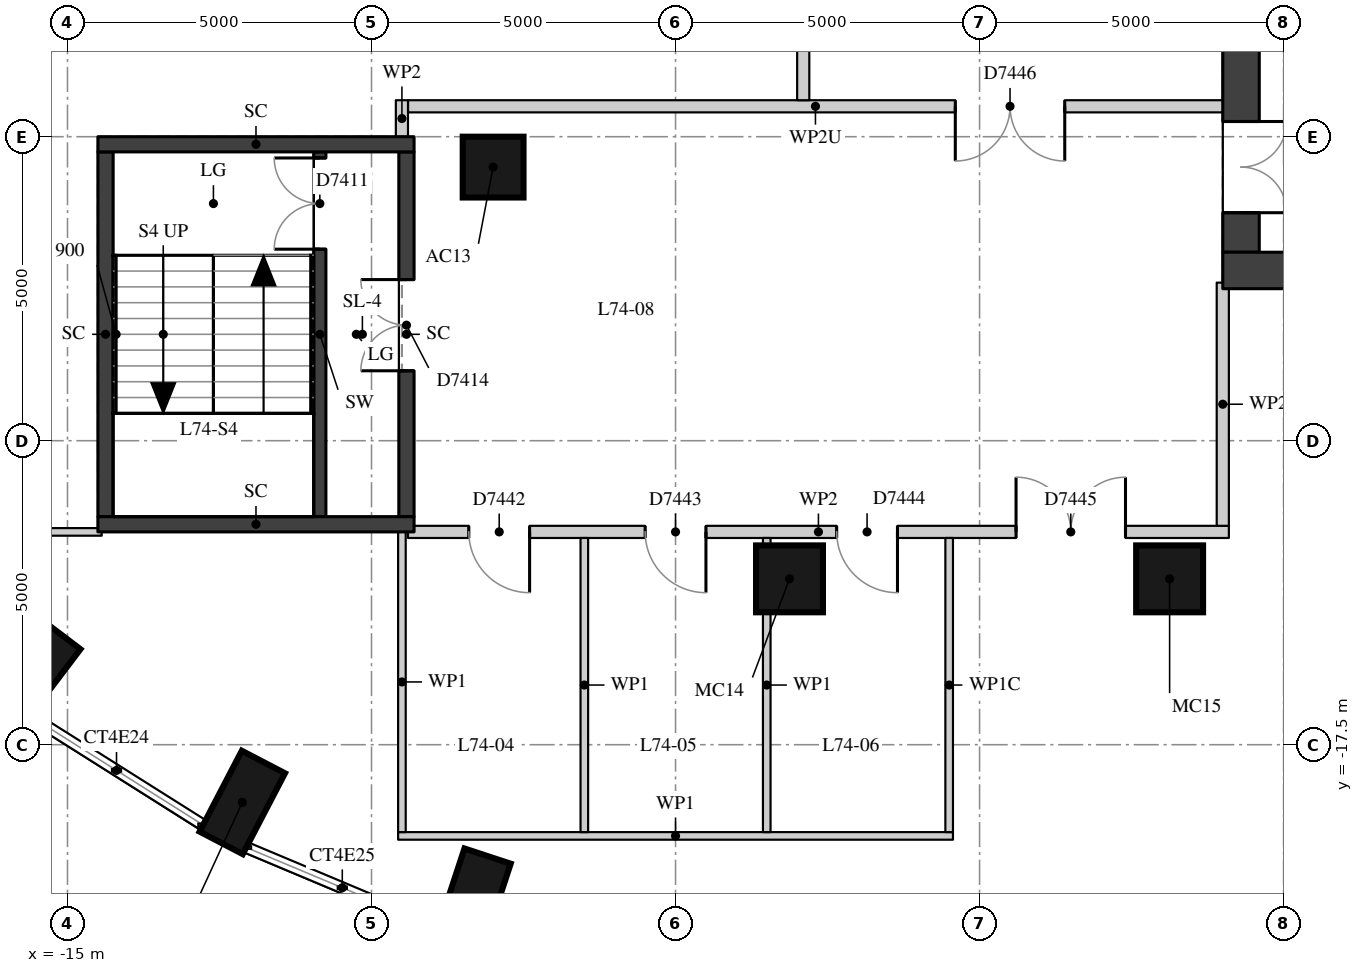
"""IFC4 building model, lengths in metres.
Left out: names, types, materials, properties, quantities, classifications, styles, units other than length and angle.
Written with IfcOpenShell. Run it as: python <this file> out.ifc"""

import sys

from ifc_helpers import new_model, si_unit, direction, frame, frame_2d, origin, origin_2d, place, context, subcontext, project, spatial, rectangle, extrude, element, fill, save


model = new_model("IFC4")
c1 = context("Model", 3, precision=1e-05, world=origin(), true_north=direction((0.0, 1.0)))
c2 = subcontext(c1, "Body", "Model", "MODEL_VIEW")
j1 = project(units=[si_unit("LENGTHUNIT", "METRE"), si_unit("PLANEANGLEUNIT", "RADIAN")], contexts=[c1])
p1 = place(None, origin())
s1 = spatial("IfcSite", under=j1, at=p1, CompositionType="ELEMENT")
p2 = place(p1, origin())
s2 = spatial("IfcBuilding", under=s1, at=p2, CompositionType="ELEMENT")
p3 = place(p2, frame((0.0, 0.0, 259.7)))
s3 = spatial("IfcBuildingStorey", under=s2, at=p3, CompositionType="ELEMENT", Elevation=259.7)
for number, where, z_axis, x_axis in (
    (1, (-15.559, -16.285, 0.0), (0.0, 0.0, 1.0), (-0.604, -0.797, 0.0)),
    (2, (-12.125, -18.449, 0.0), (0.0, 0.0, 1.0), (-0.462, -0.887, 0.0)),
    (3, (-8.326, -20.044, 0.0), (0.0, 0.0, 1.0), (-0.312, -0.95, 0.0)),
):
    element("IfcColumn", number, at=place(p3, frame(where, z_axis=z_axis, x_axis=x_axis)), inside=s3, PredefinedType="COLUMN", context=c2, shape_type="SweptSolid", body=[
        extrude(rectangle(XDim=1.5, YDim=0.8, at=origin_2d()), origin(), (0.0, 0.0, 1.0), 4.5),
    ])
p4 = place(p3, frame((-8.0, -8.0, 0.0), z_axis=(0.0, 0.0, 1.0), x_axis=(1.0, 0.0, 0.0)))
e4 = element("IfcColumn", 4, at=p4, inside=s3, PredefinedType="COLUMN", context=c2, shape_type="SweptSolid", body=[
    extrude(rectangle(XDim=1.0, YDim=1.0, at=origin_2d()), origin(), (0.0, 0.0, 1.0), 4.5),
])
for number, where, z_axis, x_axis in (
    (5, (-3.126, -14.772, 0.0), (0.0, 0.0, 1.0), (1.0, 0.0, 0.0)),
    (6, (3.126, -14.772, 0.0), (0.0, 0.0, 1.0), (1.0, 0.0, 0.0)),
):
    element("IfcColumn", number, at=place(p3, frame(where, z_axis=z_axis, x_axis=x_axis)), inside=s3, PredefinedType="COLUMN", context=c2, shape_type="SweptSolid", body=[
        extrude(rectangle(XDim=1.1, YDim=1.1, at=origin_2d()), origin(), (0.0, 0.0, 1.0), 4.5),
    ])
p5 = place(p3, frame((4.3, -9.4, 0.0), z_axis=(0.0, 0.0, 1.0), x_axis=(0.0, 1.0, 0.0)))
e7 = element("IfcWall", 7, at=p5, inside=s3, PredefinedType="SHEAR", context=c2, shape_type="SweptSolid", body=[
    extrude(rectangle(XDim=18.8, YDim=0.6, at=frame_2d((9.4, 0.0))), origin(), (0.0, 0.0, 1.0), 4.15),
])
p6 = place(p5, frame((0.65, 0.0, 0.0)))
e8 = element("IfcOpeningElement", 8, at=p6, cuts=e7, PredefinedType="OPENING", context=c2, shape_type="SweptSolid", body=[
    extrude(rectangle(XDim=1.5, YDim=2.1, at=frame_2d((0.75, 1.05))), frame((0.0, 0.31, 0.0), z_axis=(0.0, -1.0, 0.0), x_axis=(1.0, 0.0, 0.0)), (0.0, 0.0, 1.0), 0.62),
])
p7 = place(p5, frame((3.75, 0.0, 0.0)))
e9 = element("IfcOpeningElement", 9, at=p7, cuts=e7, PredefinedType="OPENING", context=c2, shape_type="SweptSolid", body=[
    extrude(rectangle(XDim=1.8, YDim=2.1, at=frame_2d((0.9, 1.05))), frame((0.0, 0.31, 0.0), z_axis=(0.0, -1.0, 0.0), x_axis=(1.0, 0.0, 0.0)), (0.0, 0.0, 1.0), 0.62),
])
p8 = place(p5, frame((6.25, 0.0, 0.0)))
e10 = element("IfcOpeningElement", 10, at=p8, cuts=e7, PredefinedType="OPENING", context=c2, shape_type="SweptSolid", body=[
    extrude(rectangle(XDim=1.1, YDim=2.1, at=frame_2d((0.55, 1.05))), frame((0.0, 0.31, 0.0), z_axis=(0.0, -1.0, 0.0), x_axis=(1.0, 0.0, 0.0)), (0.0, 0.0, 1.0), 0.62),
])
p9 = place(p5, frame((8.9, 0.0, 0.0)))
e11 = element("IfcOpeningElement", 11, at=p9, cuts=e7, PredefinedType="OPENING", context=c2, shape_type="SweptSolid", body=[
    extrude(rectangle(XDim=1.0, YDim=2.1, at=frame_2d((0.5, 1.05))), frame((0.0, 0.31, 0.0), z_axis=(0.0, -1.0, 0.0), x_axis=(1.0, 0.0, 0.0)), (0.0, 0.0, 1.0), 0.62),
])
p10 = place(p5, frame((11.45, 0.0, 0.0)))
e12 = element("IfcOpeningElement", 12, at=p10, cuts=e7, PredefinedType="OPENING", context=c2, shape_type="SweptSolid", body=[
    extrude(rectangle(XDim=1.1, YDim=2.1, at=frame_2d((0.55, 1.05))), frame((0.0, 0.31, 0.0), z_axis=(0.0, -1.0, 0.0), x_axis=(1.0, 0.0, 0.0)), (0.0, 0.0, 1.0), 0.62),
])
p11 = place(p5, frame((13.25, 0.0, 0.0)))
e13 = element("IfcOpeningElement", 13, at=p11, cuts=e7, PredefinedType="OPENING", context=c2, shape_type="SweptSolid", body=[
    extrude(rectangle(XDim=1.8, YDim=2.1, at=frame_2d((0.9, 1.05))), frame((0.0, 0.31, 0.0), z_axis=(0.0, -1.0, 0.0), x_axis=(1.0, 0.0, 0.0)), (0.0, 0.0, 1.0), 0.62),
])
p12 = place(p5, frame((16.65, 0.0, 0.0)))
e14 = element("IfcOpeningElement", 14, at=p12, cuts=e7, PredefinedType="OPENING", context=c2, shape_type="SweptSolid", body=[
    extrude(rectangle(XDim=1.5, YDim=2.1, at=frame_2d((0.75, 1.05))), frame((0.0, 0.31, 0.0), z_axis=(0.0, -1.0, 0.0), x_axis=(1.0, 0.0, 0.0)), (0.0, 0.0, 1.0), 0.62),
])
p13 = place(p3, frame((4.0, -9.7, 0.0), z_axis=(0.0, 0.0, 1.0), x_axis=(1.0, 0.0, 0.0)))
e15 = element("IfcWall", 15, at=p13, inside=s3, PredefinedType="SHEAR", context=c2, shape_type="SweptSolid", body=[
    extrude(rectangle(XDim=12.0, YDim=0.6, at=frame_2d((6.0, 0.0))), origin(), (0.0, 0.0, 1.0), 4.15),
])
p14 = place(p3, frame((-10.85, -13.75, 0.0), z_axis=(0.0, 0.0, 1.0), x_axis=(0.0, 1.0, 0.0)))
e16 = element("IfcWall", 16, at=p14, inside=s3, PredefinedType="SHEAR", context=c2, shape_type="SweptSolid", body=[
    extrude(rectangle(XDim=6.0, YDim=0.2, at=frame_2d((3.0, 0.0))), origin(), (0.0, 0.0, 1.0), 4.15),
])
p15 = place(p14, frame((4.4, 0.0, 0.0)))
e17 = element("IfcOpeningElement", 17, at=p15, cuts=e16, PredefinedType="OPENING", context=c2, shape_type="SweptSolid", body=[
    extrude(rectangle(XDim=1.5, YDim=2.1, at=frame_2d((0.75, 1.05))), frame((0.0, 0.11, 0.0), z_axis=(0.0, -1.0, 0.0), x_axis=(1.0, 0.0, 0.0)), (0.0, 0.0, 1.0), 0.22),
])
p16 = place(p3, frame((-14.375, -13.75, -0.35), z_axis=(0.0, 0.0, 1.0), x_axis=(0.0, 1.0, 0.0)))
e18 = element("IfcWall", 18, at=p16, inside=s3, PredefinedType="SHEAR", context=c2, shape_type="SweptSolid", body=[
    extrude(rectangle(XDim=6.0, YDim=0.25, at=frame_2d((3.0, 0.0))), origin(), (0.0, 0.0, 1.0), 4.5),
])
p17 = place(p3, frame((-9.425, -13.75, -0.35), z_axis=(0.0, 0.0, 1.0), x_axis=(0.0, 1.0, 0.0)))
e19 = element("IfcWall", 19, at=p17, inside=s3, PredefinedType="SHEAR", context=c2, shape_type="SweptSolid", body=[
    extrude(rectangle(XDim=6.0, YDim=0.25, at=frame_2d((3.0, 0.0))), origin(), (0.0, 0.0, 1.0), 4.5),
])
p18 = place(p17, frame((2.4, 0.0, 0.35)))
e20 = element("IfcOpeningElement", 20, at=p18, cuts=e19, PredefinedType="OPENING", context=c2, shape_type="SweptSolid", body=[
    extrude(rectangle(XDim=1.5, YDim=2.1, at=frame_2d((0.75, 1.05))), frame((0.0, 0.135, 0.0), z_axis=(0.0, -1.0, 0.0), x_axis=(1.0, 0.0, 0.0)), (0.0, 0.0, 1.0), 0.27),
])
for number, where, z_axis, x_axis in (
    (21, (-14.5, -7.625, -0.35), (0.0, 0.0, 1.0), (1.0, 0.0, 0.0)),
    (22, (-14.5, -13.875, -0.35), (0.0, 0.0, 1.0), (1.0, 0.0, 0.0)),
):
    element("IfcWall", number, at=place(p3, frame(where, z_axis=z_axis, x_axis=x_axis)), inside=s3, PredefinedType="SHEAR", context=c2, shape_type="SweptSolid", body=[
        extrude(rectangle(XDim=5.2, YDim=0.25, at=frame_2d((2.6, 0.0))), origin(), (0.0, 0.0, 1.0), 4.5),
    ])
p19 = place(p3, frame((-9.562, -19.0, 0.0), z_axis=(0.0, 0.0, 1.0), x_axis=(1.0, 0.0, 0.0)))
e23 = element("IfcWall", 23, at=p19, inside=s3, PredefinedType="PARTITIONING", context=c2, shape_type="SweptSolid", body=[
    extrude(rectangle(XDim=9.125, YDim=0.125, at=frame_2d((4.562, 0.0))), origin(), (0.0, 0.0, 1.0), 4.15),
])
p20 = place(p3, frame((-18.598, -14.0, 0.0), z_axis=(0.0, 0.0, 1.0), x_axis=(1.0, 0.0, 0.0)))
e24 = element("IfcWall", 24, at=p20, inside=s3, PredefinedType="PARTITIONING", context=c2, shape_type="SweptSolid", body=[
    extrude(rectangle(XDim=4.16, YDim=0.125, at=frame_2d((2.08, 0.0))), origin(), (0.0, 0.0, 1.0), 3.7),
])
p21 = place(p20, frame((1.18, 0.0, 0.0)))
e25 = element("IfcOpeningElement", 25, at=p21, cuts=e24, PredefinedType="OPENING", context=c2, shape_type="SweptSolid", body=[
    extrude(rectangle(XDim=1.8, YDim=2.1, at=frame_2d((0.9, 1.05))), frame((0.0, 0.073, 0.0), z_axis=(0.0, -1.0, 0.0), x_axis=(1.0, 0.0, 0.0)), (0.0, 0.0, 1.0), 0.145),
])
p22 = place(p3, frame((-9.4, -14.0, 0.0), z_axis=(0.0, 0.0, 1.0), x_axis=(1.0, 0.0, 0.0)))
e26 = element("IfcWall", 26, at=p22, inside=s3, PredefinedType="PARTITIONING", context=c2, shape_type="SweptSolid", body=[
    extrude(rectangle(XDim=13.5, YDim=0.2, at=frame_2d((6.75, 0.0))), origin(), (0.0, 0.0, 1.0), 4.15),
])
p23 = place(p22, frame((10.0, 0.0, 0.0)))
e27 = element("IfcOpeningElement", 27, at=p23, cuts=e26, PredefinedType="OPENING", context=c2, shape_type="SweptSolid", body=[
    extrude(rectangle(XDim=1.8, YDim=2.1, at=frame_2d((0.9, 1.05))), frame((0.0, 0.11, 0.0), z_axis=(0.0, -1.0, 0.0), x_axis=(1.0, 0.0, 0.0)), (0.0, 0.0, 1.0), 0.22),
])
p24 = place(p22, frame((1.0, 0.0, 0.0)))
e28 = element("IfcOpeningElement", 28, at=p24, cuts=e26, PredefinedType="OPENING", context=c2, shape_type="SweptSolid", body=[
    extrude(rectangle(XDim=1.0, YDim=2.1, at=frame_2d((0.5, 1.05))), frame((0.0, 0.11, 0.0), z_axis=(0.0, -1.0, 0.0), x_axis=(1.0, 0.0, 0.0)), (0.0, 0.0, 1.0), 0.22),
])
p25 = place(p22, frame((3.9, 0.0, 0.0)))
e29 = element("IfcOpeningElement", 29, at=p25, cuts=e26, PredefinedType="OPENING", context=c2, shape_type="SweptSolid", body=[
    extrude(rectangle(XDim=1.0, YDim=2.1, at=frame_2d((0.5, 1.05))), frame((0.0, 0.11, 0.0), z_axis=(0.0, -1.0, 0.0), x_axis=(1.0, 0.0, 0.0)), (0.0, 0.0, 1.0), 0.22),
])
p26 = place(p22, frame((7.05, 0.0, 0.0)))
e30 = element("IfcOpeningElement", 30, at=p26, cuts=e26, PredefinedType="OPENING", context=c2, shape_type="SweptSolid", body=[
    extrude(rectangle(XDim=1.0, YDim=2.1, at=frame_2d((0.5, 1.05))), frame((0.0, 0.11, 0.0), z_axis=(0.0, -1.0, 0.0), x_axis=(1.0, 0.0, 0.0)), (0.0, 0.0, 1.0), 0.22),
])
p27 = place(p3, frame((-9.4, -7.0, 0.0), z_axis=(0.0, 0.0, 1.0), x_axis=(1.0, 0.0, 0.0)))
e31 = element("IfcWall", 31, at=p27, inside=s3, PredefinedType="PARTITIONING", context=c2, shape_type="SweptSolid", body=[
    extrude(rectangle(XDim=13.402, YDim=0.2, at=frame_2d((6.701, 0.0))), origin(), (0.0, 0.0, 1.0), 3.6),
])
p28 = place(p27, frame((9.001, 0.0, 0.0)))
e32 = element("IfcOpeningElement", 32, at=p28, cuts=e31, PredefinedType="OPENING", context=c2, shape_type="SweptSolid", body=[
    extrude(rectangle(XDim=1.8, YDim=2.1, at=frame_2d((0.9, 1.05))), frame((0.0, 0.11, 0.0), z_axis=(0.0, -1.0, 0.0), x_axis=(1.0, 0.0, 0.0)), (0.0, 0.0, 1.0), 0.22),
])
p29 = place(p3, frame((-9.5, -18.938, 0.0), z_axis=(0.0, 0.0, 1.0), x_axis=(0.0, 1.0, 0.0)))
e33 = element("IfcWall", 33, at=p29, inside=s3, PredefinedType="PARTITIONING", context=c2, shape_type="SweptSolid", body=[
    extrude(rectangle(XDim=4.939, YDim=0.125, at=frame_2d((2.47, 0.0))), origin(), (0.0, 0.0, 1.0), 4.15),
])
p30 = place(p3, frame((-9.5, -7.502, 0.0), z_axis=(0.0, 0.0, 1.0), x_axis=(0.0, 1.0, 0.0)))
e34 = element("IfcWall", 34, at=p30, inside=s3, PredefinedType="PARTITIONING", context=c2, shape_type="SweptSolid", body=[
    extrude(rectangle(XDim=0.602, YDim=0.2, at=frame_2d((0.301, 0.0))), origin(), (0.0, 0.0, 1.0), 4.15),
])
for number, where, z_axis, x_axis in (
    (35, (-6.5, -18.938, 0.0), (0.0, 0.0, 1.0), (0.0, 1.0, 0.0)),
    (36, (-3.5, -18.938, 0.0), (0.0, 0.0, 1.0), (0.0, 1.0, 0.0)),
):
    element("IfcWall", number, at=place(p3, frame(where, z_axis=z_axis, x_axis=x_axis)), inside=s3, PredefinedType="PARTITIONING", context=c2, shape_type="SweptSolid", body=[
        extrude(rectangle(XDim=4.837, YDim=0.125, at=frame_2d((2.419, 0.0))), origin(), (0.0, 0.0, 1.0), 4.15),
    ])
p31 = place(p3, frame((-2.9, -6.9, 0.0), z_axis=(0.0, 0.0, 1.0), x_axis=(0.0, 1.0, 0.0)))
e37 = element("IfcWall", 37, at=p31, inside=s3, PredefinedType="PARTITIONING", context=c2, shape_type="SweptSolid", body=[
    extrude(rectangle(XDim=6.034, YDim=0.2, at=frame_2d((3.017, 0.0))), origin(), (0.0, 0.0, 1.0), 4.15),
])
p32 = place(p3, frame((-0.5, -18.938, 0.0), z_axis=(0.0, 0.0, 1.0), x_axis=(0.0, 1.0, 0.0)))
e38 = element("IfcWall", 38, at=p32, inside=s3, PredefinedType="PARTITIONING", context=c2, shape_type="SweptSolid", body=[
    extrude(rectangle(XDim=4.837, YDim=0.125, at=frame_2d((2.419, 0.0))), origin(), (0.0, 0.0, 1.0), 3.7),
])
p33 = place(p3, frame((4.0, -13.9, 0.0), z_axis=(0.0, 0.0, 1.0), x_axis=(0.0, 1.0, 0.0)))
e39 = element("IfcWall", 39, at=p33, inside=s3, PredefinedType="PARTITIONING", context=c2, shape_type="SweptSolid", body=[
    extrude(rectangle(XDim=4.0, YDim=0.2, at=frame_2d((2.0, 0.0))), origin(), (0.0, 0.0, 1.0), 4.15),
])
p34 = place(p6, origin())
e40 = element("IfcDoor", 40, at=p34, inside=s3, OperationType="DOUBLE_DOOR_SINGLE_SWING", PredefinedType="DOOR", context=c2, shape_type="SweptSolid", body=[
    extrude(rectangle(XDim=1.5, YDim=2.1, at=frame_2d((0.75, 1.05))), frame((0.0, 0.025, 0.0), z_axis=(0.0, -1.0, 0.0), x_axis=(1.0, 0.0, 0.0)), (0.0, 0.0, 1.0), 0.05),
])
fill(e8, e40)
p35 = place(p15, origin())
e41 = element("IfcDoor", 41, at=p35, inside=s3, OperationType="DOUBLE_DOOR_SINGLE_SWING", PredefinedType="DOOR", context=c2, shape_type="SweptSolid", body=[
    extrude(rectangle(XDim=1.5, YDim=2.1, at=frame_2d((0.75, 1.05))), frame((0.0, 0.025, 0.0), z_axis=(0.0, -1.0, 0.0), x_axis=(1.0, 0.0, 0.0)), (0.0, 0.0, 1.0), 0.05),
])
fill(e17, e41)
p36 = place(p18, origin())
e42 = element("IfcDoor", 42, at=p36, inside=s3, OperationType="DOUBLE_DOOR_SINGLE_SWING", PredefinedType="DOOR", context=c2, shape_type="SweptSolid", body=[
    extrude(rectangle(XDim=1.5, YDim=2.1, at=frame_2d((0.75, 1.05))), frame((0.0, 0.025, 0.0), z_axis=(0.0, -1.0, 0.0), x_axis=(1.0, 0.0, 0.0)), (0.0, 0.0, 1.0), 0.05),
])
fill(e20, e42)
p37 = place(p23, origin())
e43 = element("IfcDoor", 43, at=p37, inside=s3, OperationType="DOUBLE_DOOR_SINGLE_SWING", PredefinedType="DOOR", context=c2, shape_type="SweptSolid", body=[
    extrude(rectangle(XDim=1.8, YDim=2.1, at=frame_2d((0.9, 1.05))), frame((0.0, 0.025, 0.0), z_axis=(0.0, -1.0, 0.0), x_axis=(1.0, 0.0, 0.0)), (0.0, 0.0, 1.0), 0.05),
])
fill(e27, e43)
p38 = place(p28, origin())
e44 = element("IfcDoor", 44, at=p38, inside=s3, OperationType="DOUBLE_DOOR_SINGLE_SWING", PredefinedType="DOOR", context=c2, shape_type="SweptSolid", body=[
    extrude(rectangle(XDim=1.8, YDim=2.1, at=frame_2d((0.9, 1.05))), frame((0.0, 0.025, 0.0), z_axis=(0.0, -1.0, 0.0), x_axis=(1.0, 0.0, 0.0)), (0.0, 0.0, 1.0), 0.05),
])
fill(e32, e44)
p39 = place(p24, origin())
e45 = element("IfcDoor", 45, at=p39, inside=s3, OperationType="SINGLE_SWING_LEFT", PredefinedType="DOOR", context=c2, shape_type="SweptSolid", body=[
    extrude(rectangle(XDim=1.0, YDim=2.1, at=frame_2d((0.5, 1.05))), frame((0.0, 0.025, 0.0), z_axis=(0.0, -1.0, 0.0), x_axis=(1.0, 0.0, 0.0)), (0.0, 0.0, 1.0), 0.05),
])
fill(e28, e45)
p40 = place(p25, origin())
e46 = element("IfcDoor", 46, at=p40, inside=s3, OperationType="SINGLE_SWING_LEFT", PredefinedType="DOOR", context=c2, shape_type="SweptSolid", body=[
    extrude(rectangle(XDim=1.0, YDim=2.1, at=frame_2d((0.5, 1.05))), frame((0.0, 0.025, 0.0), z_axis=(0.0, -1.0, 0.0), x_axis=(1.0, 0.0, 0.0)), (0.0, 0.0, 1.0), 0.05),
])
fill(e29, e46)
p41 = place(p26, origin())
e47 = element("IfcDoor", 47, at=p41, inside=s3, OperationType="SINGLE_SWING_LEFT", PredefinedType="DOOR", context=c2, shape_type="SweptSolid", body=[
    extrude(rectangle(XDim=1.0, YDim=2.1, at=frame_2d((0.5, 1.05))), frame((0.0, 0.025, 0.0), z_axis=(0.0, -1.0, 0.0), x_axis=(1.0, 0.0, 0.0)), (0.0, 0.0, 1.0), 0.05),
])
fill(e30, e47)
save(model, sys.argv[1])
